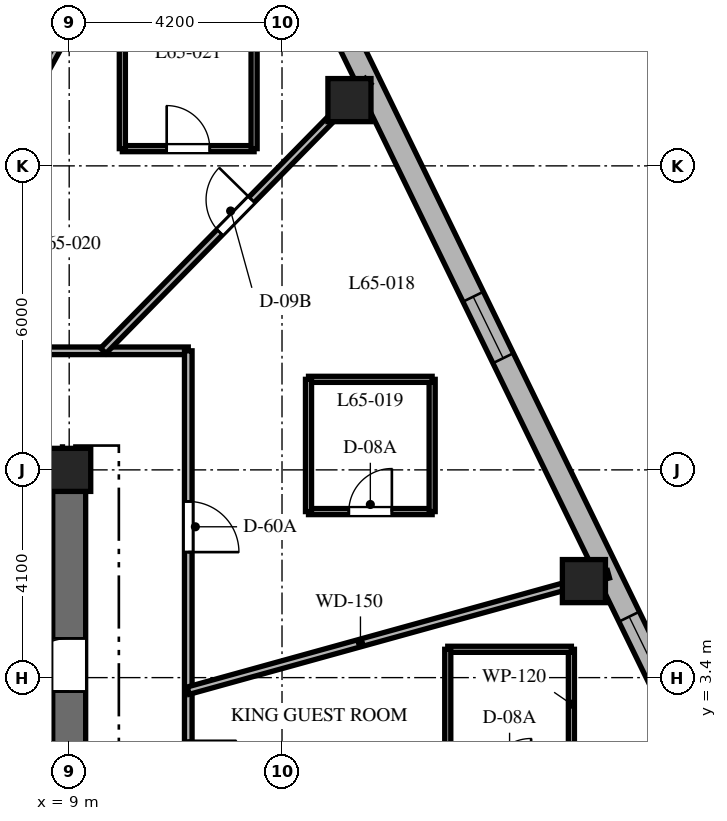
"""IFC4 building model, lengths in metres.
Left out: names, types, materials, properties, quantities, classifications, styles, units other than length and angle.
Written with IfcOpenShell. Run it as: python <this file> out.ifc"""

import sys

from ifc_helpers import new_model, si_unit, direction, frame, frame_2d, origin, origin_2d, place, context, subcontext, project, spatial, rectangle, extrude, element, fill, save


model = new_model("IFC4")
c1 = context("Model", 3, precision=1e-05, world=origin(), true_north=direction((0.0, 1.0)))
c2 = subcontext(c1, "Body", "Model", "MODEL_VIEW")
j1 = project(units=[si_unit("LENGTHUNIT", "METRE"), si_unit("PLANEANGLEUNIT", "RADIAN")], contexts=[c1])
p1 = place(None, origin())
s1 = spatial("IfcSite", under=j1, at=p1, CompositionType="ELEMENT")
p2 = place(p1, origin())
s2 = spatial("IfcBuilding", under=s1, at=p2, CompositionType="ELEMENT")
p3 = place(p2, frame((0.0, 0.0, 261.3)))
s3 = spatial("IfcBuildingStorey", under=s2, at=p3, CompositionType="ELEMENT", Elevation=261.3)
p4 = place(p3, frame((1.85, 7.5, 0.0), z_axis=(0.0, 0.0, 1.0), x_axis=(1.0, 0.0, 0.0)))
e1 = element("IfcWall", 1, at=p4, inside=s3, PredefinedType="SHEAR", context=c2, shape_type="SweptSolid", body=[
    extrude(rectangle(XDim=7.475, YDim=0.65, at=frame_2d((3.737, 0.0))), origin(), (0.0, 0.0, 1.0), 3.9),
])
p5 = place(p3, frame((9.0, -7.175, 0.0), z_axis=(0.0, 0.0, 1.0), x_axis=(0.0, 1.0, 0.0)))
e2 = element("IfcWall", 2, at=p5, inside=s3, PredefinedType="SHEAR", context=c2, shape_type="SweptSolid", body=[
    extrude(rectangle(XDim=14.35, YDim=0.65, at=frame_2d((7.175, 0.0))), origin(), (0.0, 0.0, 1.0), 3.9),
])
p6 = place(p5, frame((10.3, 0.0, 0.0)))
e3 = element("IfcOpeningElement", 3, at=p6, cuts=e2, PredefinedType="OPENING", context=c2, shape_type="SweptSolid", body=[
    extrude(rectangle(XDim=1.05, YDim=2.15, at=frame_2d((0.525, 1.075))), frame((0.0, 0.335, 0.0), z_axis=(0.0, -1.0, 0.0), x_axis=(1.0, 0.0, 0.0)), (0.0, 0.0, 1.0), 0.67),
])
for number, where, z_axis, x_axis in (
    (4, (9.0, 7.5, 0.0), (0.0, 0.0, 1.0), (1.0, 0.0, 0.0)),
    (5, (19.158, 5.305, 0.0), (0.0, 0.0, 1.0), (1.0, 0.0, 0.0)),
    (6, (14.531, 14.798, 0.0), (0.0, 0.0, 1.0), (1.0, 0.0, 0.0)),
):
    element("IfcColumn", number, at=place(p3, frame(where, z_axis=z_axis, x_axis=x_axis)), inside=s3, PredefinedType="COLUMN", context=c2, shape_type="SweptSolid", body=[
        extrude(rectangle(XDim=0.85, YDim=0.85, at=origin_2d()), origin(), (0.0, 0.0, 1.0), 3.9),
    ])
p7 = place(p3, frame((21.138, 2.371, 0.0), z_axis=(0.0, 0.0, 1.0), x_axis=(-0.438128124058, 0.89891253574, 0.0)))
e7 = element("IfcWall", 7, at=p7, inside=s3, PredefinedType="SOLIDWALL", context=c2, shape_type="SweptSolid", body=[
    extrude(rectangle(XDim=17.565, YDim=0.45, at=frame_2d((8.782, 0.0))), origin(), (0.0, 0.0, 1.0), 3.6),
])
p8 = place(p7, frame((1.133, 0.0, 0.8)))
e8 = element("IfcOpeningElement", 8, at=p8, cuts=e7, PredefinedType="OPENING", context=c2, shape_type="SweptSolid", body=[
    extrude(rectangle(XDim=1.35, YDim=1.75, at=frame_2d((0.675, 0.875))), frame((0.0, 0.235, 0.0), z_axis=(0.0, -1.0, 0.0), x_axis=(1.0, 0.0, 0.0)), (0.0, 0.0, 1.0), 0.47),
])
p9 = place(p7, frame((8.158, 0.0, 0.8)))
e9 = element("IfcOpeningElement", 9, at=p9, cuts=e7, PredefinedType="OPENING", context=c2, shape_type="SweptSolid", body=[
    extrude(rectangle(XDim=1.35, YDim=1.75, at=frame_2d((0.675, 0.875))), frame((0.0, 0.235, 0.0), z_axis=(0.0, -1.0, 0.0), x_axis=(1.0, 0.0, 0.0)), (0.0, 0.0, 1.0), 0.47),
])
p10 = place(p7, frame((15.132, 0.0, 0.8)))
e10 = element("IfcOpeningElement", 10, at=p10, cuts=e7, PredefinedType="OPENING", context=c2, shape_type="SweptSolid", body=[
    extrude(rectangle(XDim=1.35, YDim=1.75, at=frame_2d((0.675, 0.875))), frame((0.0, 0.235, 0.0), z_axis=(0.0, -1.0, 0.0), x_axis=(1.0, 0.0, 0.0)), (0.0, 0.0, 1.0), 0.47),
])
p11 = place(p3, frame((0.92, 9.85, 0.0), z_axis=(0.0, 0.0, 1.0), x_axis=(1.0, 0.0, 0.0)))
e11 = element("IfcWall", 11, at=p11, inside=s3, PredefinedType="PARTITIONING", context=c2, shape_type="SweptSolid", body=[
    extrude(rectangle(XDim=10.43, YDim=0.15, at=frame_2d((5.215, 0.0))), origin(), (0.0, 0.0, 1.0), 3.09),
])
p12 = place(p11, frame((2.86, 0.0, 0.0)))
e12 = element("IfcOpeningElement", 12, at=p12, cuts=e11, PredefinedType="OPENING", context=c2, shape_type="SweptSolid", body=[
    extrude(rectangle(XDim=0.9, YDim=2.03, at=frame_2d((0.45, 1.015))), frame((0.0, 0.085, 0.0), z_axis=(0.0, -1.0, 0.0), x_axis=(1.0, 0.0, 0.0)), (0.0, 0.0, 1.0), 0.17),
])
p13 = place(p3, frame((11.35, 9.85, 0.0), z_axis=(0.0, 0.0, 1.0), x_axis=(0.0, -1.0, 0.0)))
e13 = element("IfcWall", 13, at=p13, inside=s3, PredefinedType="PARTITIONING", context=c2, shape_type="SweptSolid", body=[
    extrude(rectangle(XDim=12.4, YDim=0.15, at=frame_2d((6.2, 0.0))), origin(), (0.0, 0.0, 1.0), 3.09),
])
p14 = place(p13, frame((7.697, 0.0, 0.0)))
e14 = element("IfcOpeningElement", 14, at=p14, cuts=e13, PredefinedType="OPENING", context=c2, shape_type="SweptSolid", body=[
    extrude(rectangle(XDim=0.95, YDim=2.03, at=frame_2d((0.475, 1.015))), frame((0.0, 0.085, 0.0), z_axis=(0.0, -1.0, 0.0), x_axis=(1.0, 0.0, 0.0)), (0.0, 0.0, 1.0), 0.17),
])
p15 = place(p13, frame((2.973, 0.0, 0.0)))
e15 = element("IfcOpeningElement", 15, at=p15, cuts=e13, PredefinedType="OPENING", context=c2, shape_type="SweptSolid", body=[
    extrude(rectangle(XDim=1.0, YDim=2.03, at=frame_2d((0.5, 1.015))), frame((0.0, 0.085, 0.0), z_axis=(0.0, -1.0, 0.0), x_axis=(1.0, 0.0, 0.0)), (0.0, 0.0, 1.0), 0.17),
])
p16 = place(p13, frame((10.333, 0.0, 0.0)))
e16 = element("IfcOpeningElement", 16, at=p16, cuts=e13, PredefinedType="OPENING", context=c2, shape_type="SweptSolid", body=[
    extrude(rectangle(XDim=0.9, YDim=2.03, at=frame_2d((0.45, 1.015))), frame((0.0, 0.085, 0.0), z_axis=(0.0, -1.0, 0.0), x_axis=(1.0, 0.0, 0.0)), (0.0, 0.0, 1.0), 0.17),
])
p17 = place(p3, frame((11.35, 3.143, 0.0), z_axis=(0.0, 0.0, 1.0), x_axis=(0.963731818141, 0.266872596386, 0.0)))
e17 = element("IfcWall", 17, at=p17, inside=s3, PredefinedType="PARTITIONING", context=c2, shape_type="SweptSolid", body=[
    extrude(rectangle(XDim=8.605, YDim=0.15, at=frame_2d((4.302, 0.0))), origin(), (0.0, 0.0, 1.0), 2.94),
])
p18 = place(p3, frame((9.672, 9.85, 0.0), z_axis=(0.0, 0.0, 1.0), x_axis=(0.700629771301, 0.713524998558, 0.0)))
e18 = element("IfcWall", 18, at=p18, inside=s3, PredefinedType="PARTITIONING", context=c2, shape_type="SweptSolid", body=[
    extrude(rectangle(XDim=7.459, YDim=0.15, at=frame_2d((3.73, 0.0))), origin(), (0.0, 0.0, 1.0), 2.94),
])
p19 = place(p18, frame((3.28, 0.0, 0.0)))
e19 = element("IfcOpeningElement", 19, at=p19, cuts=e18, PredefinedType="OPENING", context=c2, shape_type="SweptSolid", body=[
    extrude(rectangle(XDim=0.9, YDim=2.03, at=frame_2d((0.45, 1.015))), frame((0.0, 0.085, 0.0), z_axis=(0.0, -1.0, 0.0), x_axis=(1.0, 0.0, 0.0)), (0.0, 0.0, 1.0), 0.17),
])
p20 = place(p3, frame((5.454, 9.85, 0.0), z_axis=(0.0, 0.0, 1.0), x_axis=(0.48439420613, 0.874849846012, 0.0)))
e20 = element("IfcWall", 20, at=p20, inside=s3, PredefinedType="PARTITIONING", context=c2, shape_type="SweptSolid", body=[
    extrude(rectangle(XDim=11.375, YDim=0.15, at=frame_2d((5.688, 0.0))), origin(), (0.0, 0.0, 1.0), 2.94),
])
p21 = place(p3, frame((18.911, 1.349, 0.0), z_axis=(0.0, 0.0, 1.0), x_axis=(0.0, 1.0, 0.0)))
e21 = element("IfcWall", 21, at=p21, inside=s3, PredefinedType="PARTITIONING", context=c2, shape_type="SweptSolid", body=[
    extrude(rectangle(XDim=2.61, YDim=0.12, at=frame_2d((1.305, 0.0))), origin(), (0.0, 0.0, 1.0), 3.6),
])
p22 = place(p3, frame((18.911, 3.959, 0.0), z_axis=(0.0, 0.0, 1.0), x_axis=(-1.0, 0.0, 0.0)))
e22 = element("IfcWall", 22, at=p22, inside=s3, PredefinedType="PARTITIONING", context=c2, shape_type="SweptSolid", body=[
    extrude(rectangle(XDim=2.44, YDim=0.12, at=frame_2d((1.22, 0.0))), origin(), (0.0, 0.0, 1.0), 3.6),
])
p23 = place(p3, frame((16.471, 3.959, 0.0), z_axis=(0.0, 0.0, 1.0), x_axis=(0.0, -1.0, 0.0)))
e23 = element("IfcWall", 23, at=p23, inside=s3, PredefinedType="PARTITIONING", context=c2, shape_type="SweptSolid", body=[
    extrude(rectangle(XDim=2.61, YDim=0.12, at=frame_2d((1.305, 0.0))), origin(), (0.0, 0.0, 1.0), 3.6),
])
p24 = place(p3, frame((13.723, 6.677, 0.0), z_axis=(0.0, 0.0, 1.0), x_axis=(1.0, 0.0, 0.0)))
e24 = element("IfcWall", 24, at=p24, inside=s3, PredefinedType="PARTITIONING", context=c2, shape_type="SweptSolid", body=[
    extrude(rectangle(XDim=2.44, YDim=0.12, at=frame_2d((1.22, 0.0))), origin(), (0.0, 0.0, 1.0), 3.126),
])
p25 = place(p24, frame((0.795, 0.0, 0.0)))
e25 = element("IfcOpeningElement", 25, at=p25, cuts=e24, PredefinedType="OPENING", context=c2, shape_type="SweptSolid", body=[
    extrude(rectangle(XDim=0.85, YDim=2.03, at=frame_2d((0.425, 1.015))), frame((0.0, 0.07, 0.0), z_axis=(0.0, -1.0, 0.0), x_axis=(1.0, 0.0, 0.0)), (0.0, 0.0, 1.0), 0.14),
])
p26 = place(p3, frame((16.163, 6.677, 0.0), z_axis=(0.0, 0.0, 1.0), x_axis=(0.0, 1.0, 0.0)))
e26 = element("IfcWall", 26, at=p26, inside=s3, PredefinedType="PARTITIONING", context=c2, shape_type="SweptSolid", body=[
    extrude(rectangle(XDim=2.61, YDim=0.12, at=frame_2d((1.305, 0.0))), origin(), (0.0, 0.0, 1.0), 3.6),
])
p27 = place(p3, frame((16.163, 9.287, 0.0), z_axis=(0.0, 0.0, 1.0), x_axis=(-1.0, 0.0, 0.0)))
e27 = element("IfcWall", 27, at=p27, inside=s3, PredefinedType="PARTITIONING", context=c2, shape_type="SweptSolid", body=[
    extrude(rectangle(XDim=2.44, YDim=0.12, at=frame_2d((1.22, 0.0))), origin(), (0.0, 0.0, 1.0), 3.126),
])
p28 = place(p3, frame((13.723, 9.287, 0.0), z_axis=(0.0, 0.0, 1.0), x_axis=(0.0, -1.0, 0.0)))
e28 = element("IfcWall", 28, at=p28, inside=s3, PredefinedType="PARTITIONING", context=c2, shape_type="SweptSolid", body=[
    extrude(rectangle(XDim=2.61, YDim=0.12, at=frame_2d((1.305, 0.0))), origin(), (0.0, 0.0, 1.0), 3.6),
])
p29 = place(p3, frame((10.049, 13.84, 0.0), z_axis=(0.0, 0.0, 1.0), x_axis=(1.0, 0.0, 0.0)))
e29 = element("IfcWall", 29, at=p29, inside=s3, PredefinedType="PARTITIONING", context=c2, shape_type="SweptSolid", body=[
    extrude(rectangle(XDim=2.6, YDim=0.12, at=frame_2d((1.3, 0.0))), origin(), (0.0, 0.0, 1.0), 3.6),
])
p30 = place(p29, frame((0.875, 0.0, 0.0)))
e30 = element("IfcOpeningElement", 30, at=p30, cuts=e29, PredefinedType="OPENING", context=c2, shape_type="SweptSolid", body=[
    extrude(rectangle(XDim=0.85, YDim=2.03, at=frame_2d((0.425, 1.015))), frame((0.0, 0.07, 0.0), z_axis=(0.0, -1.0, 0.0), x_axis=(1.0, 0.0, 0.0)), (0.0, 0.0, 1.0), 0.14),
])
p31 = place(p3, frame((12.649, 13.84, 0.0), z_axis=(0.0, 0.0, 1.0), x_axis=(0.0, 1.0, 0.0)))
e31 = element("IfcWall", 31, at=p31, inside=s3, PredefinedType="PARTITIONING", context=c2, shape_type="SweptSolid", body=[
    extrude(rectangle(XDim=2.75, YDim=0.12, at=frame_2d((1.375, 0.0))), origin(), (0.0, 0.0, 1.0), 2.94),
])
p32 = place(p3, frame((10.049, 16.59, 0.0), z_axis=(0.0, 0.0, 1.0), x_axis=(0.0, -1.0, 0.0)))
e32 = element("IfcWall", 32, at=p32, inside=s3, PredefinedType="PARTITIONING", context=c2, shape_type="SweptSolid", body=[
    extrude(rectangle(XDim=2.75, YDim=0.12, at=frame_2d((1.375, 0.0))), origin(), (0.0, 0.0, 1.0), 3.6),
])
p33 = place(p8, origin())
e33 = element("IfcWindow", 33, at=p33, inside=s3, PartitioningType="SINGLE_PANEL", PredefinedType="WINDOW", context=c2, shape_type="SweptSolid", body=[
    extrude(rectangle(XDim=1.35, YDim=1.75, at=frame_2d((0.675, 0.875))), frame((0.0, 0.03, 0.0), z_axis=(0.0, -1.0, 0.0), x_axis=(1.0, 0.0, 0.0)), (0.0, 0.0, 1.0), 0.06),
])
fill(e8, e33)
p34 = place(p9, origin())
e34 = element("IfcWindow", 34, at=p34, inside=s3, PartitioningType="SINGLE_PANEL", PredefinedType="WINDOW", context=c2, shape_type="SweptSolid", body=[
    extrude(rectangle(XDim=1.35, YDim=1.75, at=frame_2d((0.675, 0.875))), frame((0.0, 0.03, 0.0), z_axis=(0.0, -1.0, 0.0), x_axis=(1.0, 0.0, 0.0)), (0.0, 0.0, 1.0), 0.06),
])
fill(e9, e34)
p35 = place(p6, origin())
e35 = element("IfcDoor", 35, at=p35, inside=s3, OperationType="SINGLE_SWING_LEFT", PredefinedType="DOOR", context=c2, shape_type="SweptSolid", body=[
    extrude(rectangle(XDim=1.05, YDim=2.15, at=frame_2d((0.525, 1.075))), frame((0.0, 0.025, 0.0), z_axis=(0.0, -1.0, 0.0), x_axis=(1.0, 0.0, 0.0)), (0.0, 0.0, 1.0), 0.05),
])
fill(e3, e35)
p36 = place(p14, origin())
e36 = element("IfcDoor", 36, at=p36, inside=s3, OperationType="SINGLE_SWING_LEFT", PredefinedType="DOOR", context=c2, shape_type="SweptSolid", body=[
    extrude(rectangle(XDim=0.95, YDim=2.03, at=frame_2d((0.475, 1.015))), frame((0.0, 0.025, 0.0), z_axis=(0.0, -1.0, 0.0), x_axis=(1.0, 0.0, 0.0)), (0.0, 0.0, 1.0), 0.05),
])
fill(e14, e36)
p37 = place(p15, origin())
e37 = element("IfcDoor", 37, at=p37, inside=s3, OperationType="SINGLE_SWING_RIGHT", PredefinedType="DOOR", context=c2, shape_type="SweptSolid", body=[
    extrude(rectangle(XDim=1.0, YDim=2.03, at=frame_2d((0.5, 1.015))), frame((0.0, 0.025, 0.0), z_axis=(0.0, -1.0, 0.0), x_axis=(1.0, 0.0, 0.0)), (0.0, 0.0, 1.0), 0.05),
])
fill(e15, e37)
p38 = place(p19, origin())
e38 = element("IfcDoor", 38, at=p38, inside=s3, OperationType="SINGLE_SWING_RIGHT", PredefinedType="DOOR", context=c2, shape_type="SweptSolid", body=[
    extrude(rectangle(XDim=0.9, YDim=2.03, at=frame_2d((0.45, 1.015))), frame((0.0, 0.025, 0.0), z_axis=(0.0, -1.0, 0.0), x_axis=(1.0, 0.0, 0.0)), (0.0, 0.0, 1.0), 0.05),
])
fill(e19, e38)
p39 = place(p25, origin())
e39 = element("IfcDoor", 39, at=p39, inside=s3, OperationType="SINGLE_SWING_RIGHT", PredefinedType="DOOR", context=c2, shape_type="SweptSolid", body=[
    extrude(rectangle(XDim=0.85, YDim=2.03, at=frame_2d((0.425, 1.015))), frame((0.0, 0.025, 0.0), z_axis=(0.0, -1.0, 0.0), x_axis=(1.0, 0.0, 0.0)), (0.0, 0.0, 1.0), 0.05),
])
fill(e25, e39)
p40 = place(p30, origin())
e40 = element("IfcDoor", 40, at=p40, inside=s3, OperationType="SINGLE_SWING_LEFT", PredefinedType="DOOR", context=c2, shape_type="SweptSolid", body=[
    extrude(rectangle(XDim=0.85, YDim=2.03, at=frame_2d((0.425, 1.015))), frame((0.0, 0.025, 0.0), z_axis=(0.0, -1.0, 0.0), x_axis=(1.0, 0.0, 0.0)), (0.0, 0.0, 1.0), 0.05),
])
fill(e30, e40)
save(model, sys.argv[1])
